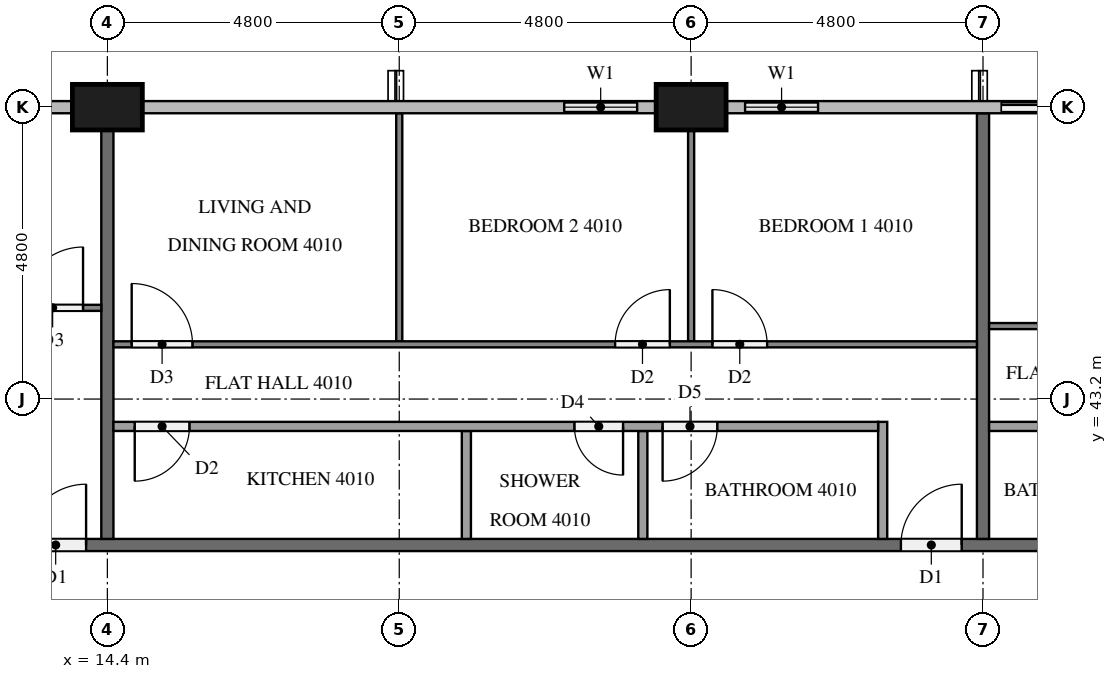
"""IFC4 building model, lengths in metres.
Left out: names, types, materials, properties, quantities, classifications, styles, units other than length and angle.
Written with IfcOpenShell. Run it as: python <this file> out.ifc"""

import sys

from ifc_helpers import new_model, si_unit, direction, frame, frame_2d, origin, origin_2d, place, context, subcontext, project, spatial, rectangle, extrude, element, fill, save


model = new_model("IFC4")
c1 = context("Model", 3, precision=1e-05, world=origin(), true_north=direction((0.0, 1.0)))
c2 = subcontext(c1, "Body", "Model", "MODEL_VIEW")
j1 = project(units=[si_unit("LENGTHUNIT", "METRE"), si_unit("PLANEANGLEUNIT", "RADIAN")], contexts=[c1])
p1 = place(None, origin())
s1 = spatial("IfcSite", under=j1, at=p1, CompositionType="ELEMENT")
p2 = place(p1, origin())
s2 = spatial("IfcBuilding", under=s1, at=p2, CompositionType="ELEMENT")
p3 = place(p2, frame((0.0, 0.0, 156.0)))
s3 = spatial("IfcBuildingStorey", under=s2, at=p3, CompositionType="ELEMENT", Elevation=156.0)
for number, where, z_axis, x_axis in (
    (1, (24.0, 48.0, 0.0), (0.0, 0.0, 1.0), (1.0, 0.0, 0.0)),
    (2, (14.4, 48.0, 0.0), (0.0, 0.0, 1.0), (1.0, 0.0, 0.0)),
):
    element("IfcColumn", number, at=place(p3, frame(where, z_axis=z_axis, x_axis=x_axis)), inside=s3, PredefinedType="COLUMN", context=c2, shape_type="SweptSolid", body=[
        extrude(rectangle(XDim=1.15, YDim=0.75, at=origin_2d()), origin(), (0.0, 0.0, 1.0), 3.2),
    ])
p4 = place(p3, frame((31.2, 48.0, 0.0), z_axis=(0.0, 0.0, 1.0), x_axis=(-1.0, 0.0, 0.0)))
e3 = element("IfcWall", 3, at=p4, inside=s3, PredefinedType="SOLIDWALL", context=c2, shape_type="SweptSolid", body=[
    extrude(rectangle(XDim=2.4, YDim=0.15, at=frame_2d((1.2, 0.0))), origin(), (0.0, 0.0, 1.0), 3.2),
])
p5 = place(p4, frame((0.3, 0.0, 0.0)))
e4 = element("IfcOpeningElement", 4, at=p5, cuts=e3, PredefinedType="OPENING", context=c2, shape_type="SweptSolid", body=[
    extrude(rectangle(XDim=1.8, YDim=2.4, at=frame_2d((0.9, 1.2))), frame((0.0, 0.085, 0.0), z_axis=(0.0, -1.0, 0.0), x_axis=(1.0, 0.0, 0.0)), (0.0, 0.0, 1.0), 0.17),
])
p6 = place(p3, frame((26.4, 48.0, 0.0), z_axis=(0.0, 0.0, 1.0), x_axis=(-1.0, 0.0, 0.0)))
e5 = element("IfcWall", 5, at=p6, inside=s3, PredefinedType="SOLIDWALL", context=c2, shape_type="SweptSolid", body=[
    extrude(rectangle(XDim=1.825, YDim=0.15, at=frame_2d((0.913, 0.0))), origin(), (0.0, 0.0, 1.0), 3.2),
])
p7 = place(p6, frame((0.312, 0.0, 0.9)))
e6 = element("IfcOpeningElement", 6, at=p7, cuts=e5, PredefinedType="OPENING", context=c2, shape_type="SweptSolid", body=[
    extrude(rectangle(XDim=1.2, YDim=1.4, at=frame_2d((0.6, 0.7))), frame((0.0, 0.085, 0.0), z_axis=(0.0, -1.0, 0.0), x_axis=(1.0, 0.0, 0.0)), (0.0, 0.0, 1.0), 0.17),
])
p8 = place(p3, frame((23.425, 48.0, 0.0), z_axis=(0.0, 0.0, 1.0), x_axis=(-1.0, 0.0, 0.0)))
e7 = element("IfcWall", 7, at=p8, inside=s3, PredefinedType="SOLIDWALL", context=c2, shape_type="SweptSolid", body=[
    extrude(rectangle(XDim=1.825, YDim=0.15, at=frame_2d((0.913, 0.0))), origin(), (0.0, 0.0, 1.0), 3.2),
])
p9 = place(p8, frame((0.312, 0.0, 0.9)))
e8 = element("IfcOpeningElement", 8, at=p9, cuts=e7, PredefinedType="OPENING", context=c2, shape_type="SweptSolid", body=[
    extrude(rectangle(XDim=1.2, YDim=1.4, at=frame_2d((0.6, 0.7))), frame((0.0, 0.085, 0.0), z_axis=(0.0, -1.0, 0.0), x_axis=(1.0, 0.0, 0.0)), (0.0, 0.0, 1.0), 0.17),
])
p10 = place(p3, frame((11.9, 40.8, 0.0), z_axis=(0.0, 0.0, 1.0), x_axis=(1.0, 0.0, 0.0)))
e9 = element("IfcWall", 9, at=p10, inside=s3, PredefinedType="PARTITIONING", context=c2, shape_type="SweptSolid", body=[
    extrude(rectangle(XDim=38.6, YDim=0.2, at=frame_2d((19.3, 0.0))), origin(), (0.0, 0.0, 1.0), 3.2),
])
p11 = place(p10, frame((31.65, 0.0, 0.0)))
e10 = element("IfcOpeningElement", 10, at=p11, cuts=e9, PredefinedType="OPENING", context=c2, shape_type="SweptSolid", body=[
    extrude(rectangle(XDim=1.0, YDim=2.1, at=frame_2d((0.5, 1.05))), frame((0.0, 0.11, 0.0), z_axis=(0.0, -1.0, 0.0), x_axis=(1.0, 0.0, 0.0)), (0.0, 0.0, 1.0), 0.22),
])
p12 = place(p10, frame((29.95, 0.0, 0.0)))
e11 = element("IfcOpeningElement", 11, at=p12, cuts=e9, PredefinedType="OPENING", context=c2, shape_type="SweptSolid", body=[
    extrude(rectangle(XDim=1.0, YDim=2.1, at=frame_2d((0.5, 1.05))), frame((0.0, 0.11, 0.0), z_axis=(0.0, -1.0, 0.0), x_axis=(1.0, 0.0, 0.0)), (0.0, 0.0, 1.0), 0.22),
])
p13 = place(p10, frame((15.55, 0.0, 0.0)))
e12 = element("IfcOpeningElement", 12, at=p13, cuts=e9, PredefinedType="OPENING", context=c2, shape_type="SweptSolid", body=[
    extrude(rectangle(XDim=1.0, YDim=2.1, at=frame_2d((0.5, 1.05))), frame((0.0, 0.11, 0.0), z_axis=(0.0, -1.0, 0.0), x_axis=(1.0, 0.0, 0.0)), (0.0, 0.0, 1.0), 0.22),
])
p14 = place(p10, frame((1.15, 0.0, 0.0)))
e13 = element("IfcOpeningElement", 13, at=p14, cuts=e9, PredefinedType="OPENING", context=c2, shape_type="SweptSolid", body=[
    extrude(rectangle(XDim=1.0, YDim=2.1, at=frame_2d((0.5, 1.05))), frame((0.0, 0.11, 0.0), z_axis=(0.0, -1.0, 0.0), x_axis=(1.0, 0.0, 0.0)), (0.0, 0.0, 1.0), 0.22),
])
p15 = place(p3, frame((28.8, 47.9, 0.0), z_axis=(0.0, 0.0, 1.0), x_axis=(0.0, -1.0, 0.0)))
e14 = element("IfcWall", 14, at=p15, inside=s3, PredefinedType="PARTITIONING", context=c2, shape_type="SweptSolid", body=[
    extrude(rectangle(XDim=7.0, YDim=0.2, at=frame_2d((3.5, 0.0))), origin(), (0.0, 0.0, 1.0), 3.2),
])
p16 = place(p3, frame((14.4, 47.625, 0.0), z_axis=(0.0, 0.0, 1.0), x_axis=(0.0, -1.0, 0.0)))
e15 = element("IfcWall", 15, at=p16, inside=s3, PredefinedType="PARTITIONING", context=c2, shape_type="SweptSolid", body=[
    extrude(rectangle(XDim=6.725, YDim=0.2, at=frame_2d((3.363, 0.0))), origin(), (0.0, 0.0, 1.0), 3.2),
])
p17 = place(p3, frame((28.9, 44.4, 0.0), z_axis=(0.0, 0.0, 1.0), x_axis=(1.0, 0.0, 0.0)))
e16 = element("IfcWall", 16, at=p17, inside=s3, PredefinedType="PARTITIONING", context=c2, shape_type="SweptSolid", body=[
    extrude(rectangle(XDim=14.2, YDim=0.1, at=frame_2d((7.1, 0.0))), origin(), (0.0, 0.0, 1.0), 3.2),
])
p18 = place(p17, frame((13.0, 0.0, 0.0)))
e17 = element("IfcOpeningElement", 17, at=p18, cuts=e16, PredefinedType="OPENING", context=c2, shape_type="SweptSolid", body=[
    extrude(rectangle(XDim=0.9, YDim=2.1, at=frame_2d((0.45, 1.05))), frame((0.0, 0.06, 0.0), z_axis=(0.0, -1.0, 0.0), x_axis=(1.0, 0.0, 0.0)), (0.0, 0.0, 1.0), 0.12),
])
p19 = place(p17, frame((5.05, 0.0, 0.0)))
e18 = element("IfcOpeningElement", 18, at=p19, cuts=e16, PredefinedType="OPENING", context=c2, shape_type="SweptSolid", body=[
    extrude(rectangle(XDim=0.9, YDim=2.1, at=frame_2d((0.45, 1.05))), frame((0.0, 0.06, 0.0), z_axis=(0.0, -1.0, 0.0), x_axis=(1.0, 0.0, 0.0)), (0.0, 0.0, 1.0), 0.12),
])
p20 = place(p17, frame((3.35, 0.0, 0.0)))
e19 = element("IfcOpeningElement", 19, at=p20, cuts=e16, PredefinedType="OPENING", context=c2, shape_type="SweptSolid", body=[
    extrude(rectangle(XDim=1.0, YDim=2.1, at=frame_2d((0.5, 1.05))), frame((0.0, 0.06, 0.0), z_axis=(0.0, -1.0, 0.0), x_axis=(1.0, 0.0, 0.0)), (0.0, 0.0, 1.0), 0.12),
])
p21 = place(p3, frame((41.475, 42.75, 0.0), z_axis=(0.0, 0.0, 1.0), x_axis=(-1.0, 0.0, 0.0)))
e20 = element("IfcWall", 20, at=p21, inside=s3, PredefinedType="PARTITIONING", context=c2, shape_type="SweptSolid", body=[
    extrude(rectangle(XDim=12.575, YDim=0.15, at=frame_2d((6.288, 0.0))), origin(), (0.0, 0.0, 1.0), 3.2),
])
p22 = place(p21, frame((0.3, 0.0, 0.0)))
e21 = element("IfcOpeningElement", 21, at=p22, cuts=e20, PredefinedType="OPENING", context=c2, shape_type="SweptSolid", body=[
    extrude(rectangle(XDim=0.9, YDim=2.1, at=frame_2d((0.45, 1.05))), frame((0.0, 0.085, 0.0), z_axis=(0.0, -1.0, 0.0), x_axis=(1.0, 0.0, 0.0)), (0.0, 0.0, 1.0), 0.17),
])
p23 = place(p21, frame((7.581, 0.0, 0.0)))
e22 = element("IfcOpeningElement", 22, at=p23, cuts=e20, PredefinedType="OPENING", context=c2, shape_type="SweptSolid", body=[
    extrude(rectangle(XDim=0.8, YDim=2.1, at=frame_2d((0.4, 1.05))), frame((0.0, 0.085, 0.0), z_axis=(0.0, -1.0, 0.0), x_axis=(1.0, 0.0, 0.0)), (0.0, 0.0, 1.0), 0.17),
])
p24 = place(p21, frame((9.031, 0.0, 0.0)))
e23 = element("IfcOpeningElement", 23, at=p24, cuts=e20, PredefinedType="OPENING", context=c2, shape_type="SweptSolid", body=[
    extrude(rectangle(XDim=0.9, YDim=2.1, at=frame_2d((0.45, 1.05))), frame((0.0, 0.085, 0.0), z_axis=(0.0, -1.0, 0.0), x_axis=(1.0, 0.0, 0.0)), (0.0, 0.0, 1.0), 0.17),
])
p25 = place(p3, frame((24.0, 44.15, 0.0), z_axis=(0.0, 0.0, 1.0), x_axis=(0.0, 1.0, 0.0)))
e24 = element("IfcWall", 24, at=p25, inside=s3, PredefinedType="PARTITIONING", context=c2, shape_type="SweptSolid", body=[
    extrude(rectangle(XDim=3.475, YDim=0.1, at=frame_2d((1.738, 0.0))), origin(), (0.0, 0.0, 1.0), 3.2),
])
p26 = place(p3, frame((19.2, 44.15, 0.0), z_axis=(0.0, 0.0, 1.0), x_axis=(0.0, 1.0, 0.0)))
e25 = element("IfcWall", 25, at=p26, inside=s3, PredefinedType="PARTITIONING", context=c2, shape_type="SweptSolid", body=[
    extrude(rectangle(XDim=3.75, YDim=0.1, at=frame_2d((1.875, 0.0))), origin(), (0.0, 0.0, 1.0), 3.2),
])
p27 = place(p3, frame((14.5, 44.1, 0.0), z_axis=(0.0, 0.0, 1.0), x_axis=(1.0, 0.0, 0.0)))
e26 = element("IfcWall", 26, at=p27, inside=s3, PredefinedType="PARTITIONING", context=c2, shape_type="SweptSolid", body=[
    extrude(rectangle(XDim=14.2, YDim=0.1, at=frame_2d((7.1, 0.0))), origin(), (0.0, 0.0, 1.0), 3.2),
])
p28 = place(p27, frame((9.85, 0.0, 0.0)))
e27 = element("IfcOpeningElement", 27, at=p28, cuts=e26, PredefinedType="OPENING", context=c2, shape_type="SweptSolid", body=[
    extrude(rectangle(XDim=0.9, YDim=2.1, at=frame_2d((0.45, 1.05))), frame((0.0, 0.06, 0.0), z_axis=(0.0, -1.0, 0.0), x_axis=(1.0, 0.0, 0.0)), (0.0, 0.0, 1.0), 0.12),
])
p29 = place(p27, frame((8.25, 0.0, 0.0)))
e28 = element("IfcOpeningElement", 28, at=p29, cuts=e26, PredefinedType="OPENING", context=c2, shape_type="SweptSolid", body=[
    extrude(rectangle(XDim=0.9, YDim=2.1, at=frame_2d((0.45, 1.05))), frame((0.0, 0.06, 0.0), z_axis=(0.0, -1.0, 0.0), x_axis=(1.0, 0.0, 0.0)), (0.0, 0.0, 1.0), 0.12),
])
p30 = place(p27, frame((0.3, 0.0, 0.0)))
e29 = element("IfcOpeningElement", 29, at=p30, cuts=e26, PredefinedType="OPENING", context=c2, shape_type="SweptSolid", body=[
    extrude(rectangle(XDim=1.0, YDim=2.1, at=frame_2d((0.5, 1.05))), frame((0.0, 0.06, 0.0), z_axis=(0.0, -1.0, 0.0), x_axis=(1.0, 0.0, 0.0)), (0.0, 0.0, 1.0), 0.12),
])
for number, where, z_axis, x_axis in (
    (30, (23.206, 40.9, 0.0), (0.0, 0.0, 1.0), (0.0, 1.0, 0.0)),
    (31, (20.304, 40.9, 0.0), (0.0, 0.0, 1.0), (0.0, 1.0, 0.0)),
):
    element("IfcWall", number, at=place(p3, frame(where, z_axis=z_axis, x_axis=x_axis)), inside=s3, PredefinedType="PARTITIONING", context=c2, shape_type="SweptSolid", body=[
        extrude(rectangle(XDim=1.775, YDim=0.15, at=frame_2d((0.888, 0.0))), origin(), (0.0, 0.0, 1.0), 3.2),
    ])
p31 = place(p3, frame((27.15, 40.9, 0.0), z_axis=(0.0, 0.0, 1.0), x_axis=(0.0, 1.0, 0.0)))
e32 = element("IfcWall", 32, at=p31, inside=s3, PredefinedType="PARTITIONING", context=c2, shape_type="SweptSolid", body=[
    extrude(rectangle(XDim=1.925, YDim=0.15, at=frame_2d((0.962, 0.0))), origin(), (0.0, 0.0, 1.0), 3.2),
])
p32 = place(p3, frame((27.075, 42.75, 0.0), z_axis=(0.0, 0.0, 1.0), x_axis=(-1.0, 0.0, 0.0)))
e33 = element("IfcWall", 33, at=p32, inside=s3, PredefinedType="PARTITIONING", context=c2, shape_type="SweptSolid", body=[
    extrude(rectangle(XDim=12.575, YDim=0.15, at=frame_2d((6.288, 0.0))), origin(), (0.0, 0.0, 1.0), 3.2),
])
p33 = place(p32, frame((2.644, 0.0, 0.0)))
e34 = element("IfcOpeningElement", 34, at=p33, cuts=e33, PredefinedType="OPENING", context=c2, shape_type="SweptSolid", body=[
    extrude(rectangle(XDim=0.9, YDim=2.1, at=frame_2d((0.45, 1.05))), frame((0.0, 0.085, 0.0), z_axis=(0.0, -1.0, 0.0), x_axis=(1.0, 0.0, 0.0)), (0.0, 0.0, 1.0), 0.17),
])
p34 = place(p32, frame((4.194, 0.0, 0.0)))
e35 = element("IfcOpeningElement", 35, at=p34, cuts=e33, PredefinedType="OPENING", context=c2, shape_type="SweptSolid", body=[
    extrude(rectangle(XDim=0.8, YDim=2.1, at=frame_2d((0.4, 1.05))), frame((0.0, 0.085, 0.0), z_axis=(0.0, -1.0, 0.0), x_axis=(1.0, 0.0, 0.0)), (0.0, 0.0, 1.0), 0.17),
])
p35 = place(p32, frame((11.325, 0.0, 0.0)))
e36 = element("IfcOpeningElement", 36, at=p35, cuts=e33, PredefinedType="OPENING", context=c2, shape_type="SweptSolid", body=[
    extrude(rectangle(XDim=0.9, YDim=2.1, at=frame_2d((0.45, 1.05))), frame((0.0, 0.085, 0.0), z_axis=(0.0, -1.0, 0.0), x_axis=(1.0, 0.0, 0.0)), (0.0, 0.0, 1.0), 0.17),
])
p36 = place(p3, frame((0.502, 44.7, 0.0), z_axis=(0.0, 0.0, 1.0), x_axis=(1.0, 0.0, 0.0)))
e37 = element("IfcWall", 37, at=p36, inside=s3, PredefinedType="PARTITIONING", context=c2, shape_type="SweptSolid", body=[
    extrude(rectangle(XDim=13.798, YDim=0.1, at=frame_2d((6.899, 0.0))), origin(), (0.0, 0.0, 1.0), 3.2),
])
p37 = place(p36, frame((12.498, 0.0, 0.0)))
e38 = element("IfcOpeningElement", 38, at=p37, cuts=e37, PredefinedType="OPENING", context=c2, shape_type="SweptSolid", body=[
    extrude(rectangle(XDim=1.0, YDim=2.1, at=frame_2d((0.5, 1.05))), frame((0.0, 0.06, 0.0), z_axis=(0.0, -1.0, 0.0), x_axis=(1.0, 0.0, 0.0)), (0.0, 0.0, 1.0), 0.12),
])
p38 = place(p36, frame((4.648, 0.0, 0.0)))
e39 = element("IfcOpeningElement", 39, at=p38, cuts=e37, PredefinedType="OPENING", context=c2, shape_type="SweptSolid", body=[
    extrude(rectangle(XDim=0.9, YDim=2.1, at=frame_2d((0.45, 1.05))), frame((0.0, 0.06, 0.0), z_axis=(0.0, -1.0, 0.0), x_axis=(1.0, 0.0, 0.0)), (0.0, 0.0, 1.0), 0.12),
])
p39 = place(p36, frame((3.048, 0.0, 0.0)))
e40 = element("IfcOpeningElement", 40, at=p39, cuts=e37, PredefinedType="OPENING", context=c2, shape_type="SweptSolid", body=[
    extrude(rectangle(XDim=0.9, YDim=2.1, at=frame_2d((0.45, 1.05))), frame((0.0, 0.06, 0.0), z_axis=(0.0, -1.0, 0.0), x_axis=(1.0, 0.0, 0.0)), (0.0, 0.0, 1.0), 0.12),
])
p40 = place(p5, origin())
e41 = element("IfcDoor", 41, at=p40, inside=s3, OperationType="SLIDING_TO_LEFT", PredefinedType="DOOR", context=c2, shape_type="SweptSolid", body=[
    extrude(rectangle(XDim=1.8, YDim=2.4, at=frame_2d((0.9, 1.2))), frame((0.0, 0.025, 0.0), z_axis=(0.0, -1.0, 0.0), x_axis=(1.0, 0.0, 0.0)), (0.0, 0.0, 1.0), 0.05),
])
fill(e4, e41)
p41 = place(p7, origin())
e42 = element("IfcWindow", 42, at=p41, inside=s3, PartitioningType="SINGLE_PANEL", PredefinedType="WINDOW", context=c2, shape_type="SweptSolid", body=[
    extrude(rectangle(XDim=1.2, YDim=1.4, at=frame_2d((0.6, 0.7))), frame((0.0, 0.03, 0.0), z_axis=(0.0, -1.0, 0.0), x_axis=(1.0, 0.0, 0.0)), (0.0, 0.0, 1.0), 0.06),
])
fill(e6, e42)
p42 = place(p9, origin())
e43 = element("IfcWindow", 43, at=p42, inside=s3, PartitioningType="SINGLE_PANEL", PredefinedType="WINDOW", context=c2, shape_type="SweptSolid", body=[
    extrude(rectangle(XDim=1.2, YDim=1.4, at=frame_2d((0.6, 0.7))), frame((0.0, 0.03, 0.0), z_axis=(0.0, -1.0, 0.0), x_axis=(1.0, 0.0, 0.0)), (0.0, 0.0, 1.0), 0.06),
])
fill(e8, e43)
p43 = place(p13, origin())
e44 = element("IfcDoor", 44, at=p43, inside=s3, OperationType="SINGLE_SWING_RIGHT", PredefinedType="DOOR", context=c2, shape_type="SweptSolid", body=[
    extrude(rectangle(XDim=1.0, YDim=2.1, at=frame_2d((0.5, 1.05))), frame((0.0, 0.025, 0.0), z_axis=(0.0, -1.0, 0.0), x_axis=(1.0, 0.0, 0.0)), (0.0, 0.0, 1.0), 0.05),
])
fill(e12, e44)
p44 = place(p14, origin())
e45 = element("IfcDoor", 45, at=p44, inside=s3, OperationType="SINGLE_SWING_RIGHT", PredefinedType="DOOR", context=c2, shape_type="SweptSolid", body=[
    extrude(rectangle(XDim=1.0, YDim=2.1, at=frame_2d((0.5, 1.05))), frame((0.0, 0.025, 0.0), z_axis=(0.0, -1.0, 0.0), x_axis=(1.0, 0.0, 0.0)), (0.0, 0.0, 1.0), 0.05),
])
fill(e13, e45)
p45 = place(p28, origin())
e46 = element("IfcDoor", 46, at=p45, inside=s3, OperationType="SINGLE_SWING_LEFT", PredefinedType="DOOR", context=c2, shape_type="SweptSolid", body=[
    extrude(rectangle(XDim=0.9, YDim=2.1, at=frame_2d((0.45, 1.05))), frame((0.0, 0.025, 0.0), z_axis=(0.0, -1.0, 0.0), x_axis=(1.0, 0.0, 0.0)), (0.0, 0.0, 1.0), 0.05),
])
fill(e27, e46)
p46 = place(p29, origin())
e47 = element("IfcDoor", 47, at=p46, inside=s3, OperationType="SINGLE_SWING_RIGHT", PredefinedType="DOOR", context=c2, shape_type="SweptSolid", body=[
    extrude(rectangle(XDim=0.9, YDim=2.1, at=frame_2d((0.45, 1.05))), frame((0.0, 0.025, 0.0), z_axis=(0.0, -1.0, 0.0), x_axis=(1.0, 0.0, 0.0)), (0.0, 0.0, 1.0), 0.05),
])
fill(e28, e47)
p47 = place(p30, origin())
e48 = element("IfcDoor", 48, at=p47, inside=s3, OperationType="SINGLE_SWING_LEFT", PredefinedType="DOOR", context=c2, shape_type="SweptSolid", body=[
    extrude(rectangle(XDim=1.0, YDim=2.1, at=frame_2d((0.5, 1.05))), frame((0.0, 0.025, 0.0), z_axis=(0.0, -1.0, 0.0), x_axis=(1.0, 0.0, 0.0)), (0.0, 0.0, 1.0), 0.05),
])
fill(e29, e48)
p48 = place(p33, origin())
e49 = element("IfcDoor", 49, at=p48, inside=s3, OperationType="SINGLE_SWING_RIGHT", PredefinedType="DOOR", context=c2, shape_type="SweptSolid", body=[
    extrude(rectangle(XDim=0.9, YDim=2.1, at=frame_2d((0.45, 1.05))), frame((0.0, 0.025, 0.0), z_axis=(0.0, -1.0, 0.0), x_axis=(1.0, 0.0, 0.0)), (0.0, 0.0, 1.0), 0.05),
])
fill(e34, e49)
p49 = place(p34, origin())
e50 = element("IfcDoor", 50, at=p49, inside=s3, OperationType="SINGLE_SWING_LEFT", PredefinedType="DOOR", context=c2, shape_type="SweptSolid", body=[
    extrude(rectangle(XDim=0.8, YDim=2.1, at=frame_2d((0.4, 1.05))), frame((0.0, 0.025, 0.0), z_axis=(0.0, -1.0, 0.0), x_axis=(1.0, 0.0, 0.0)), (0.0, 0.0, 1.0), 0.05),
])
fill(e35, e50)
p50 = place(p35, origin())
e51 = element("IfcDoor", 51, at=p50, inside=s3, OperationType="SINGLE_SWING_RIGHT", PredefinedType="DOOR", context=c2, shape_type="SweptSolid", body=[
    extrude(rectangle(XDim=0.9, YDim=2.1, at=frame_2d((0.45, 1.05))), frame((0.0, 0.025, 0.0), z_axis=(0.0, -1.0, 0.0), x_axis=(1.0, 0.0, 0.0)), (0.0, 0.0, 1.0), 0.05),
])
fill(e36, e51)
p51 = place(p37, origin())
e52 = element("IfcDoor", 52, at=p51, inside=s3, OperationType="SINGLE_SWING_RIGHT", PredefinedType="DOOR", context=c2, shape_type="SweptSolid", body=[
    extrude(rectangle(XDim=1.0, YDim=2.1, at=frame_2d((0.5, 1.05))), frame((0.0, 0.025, 0.0), z_axis=(0.0, -1.0, 0.0), x_axis=(1.0, 0.0, 0.0)), (0.0, 0.0, 1.0), 0.05),
])
fill(e38, e52)
save(model, sys.argv[1])
